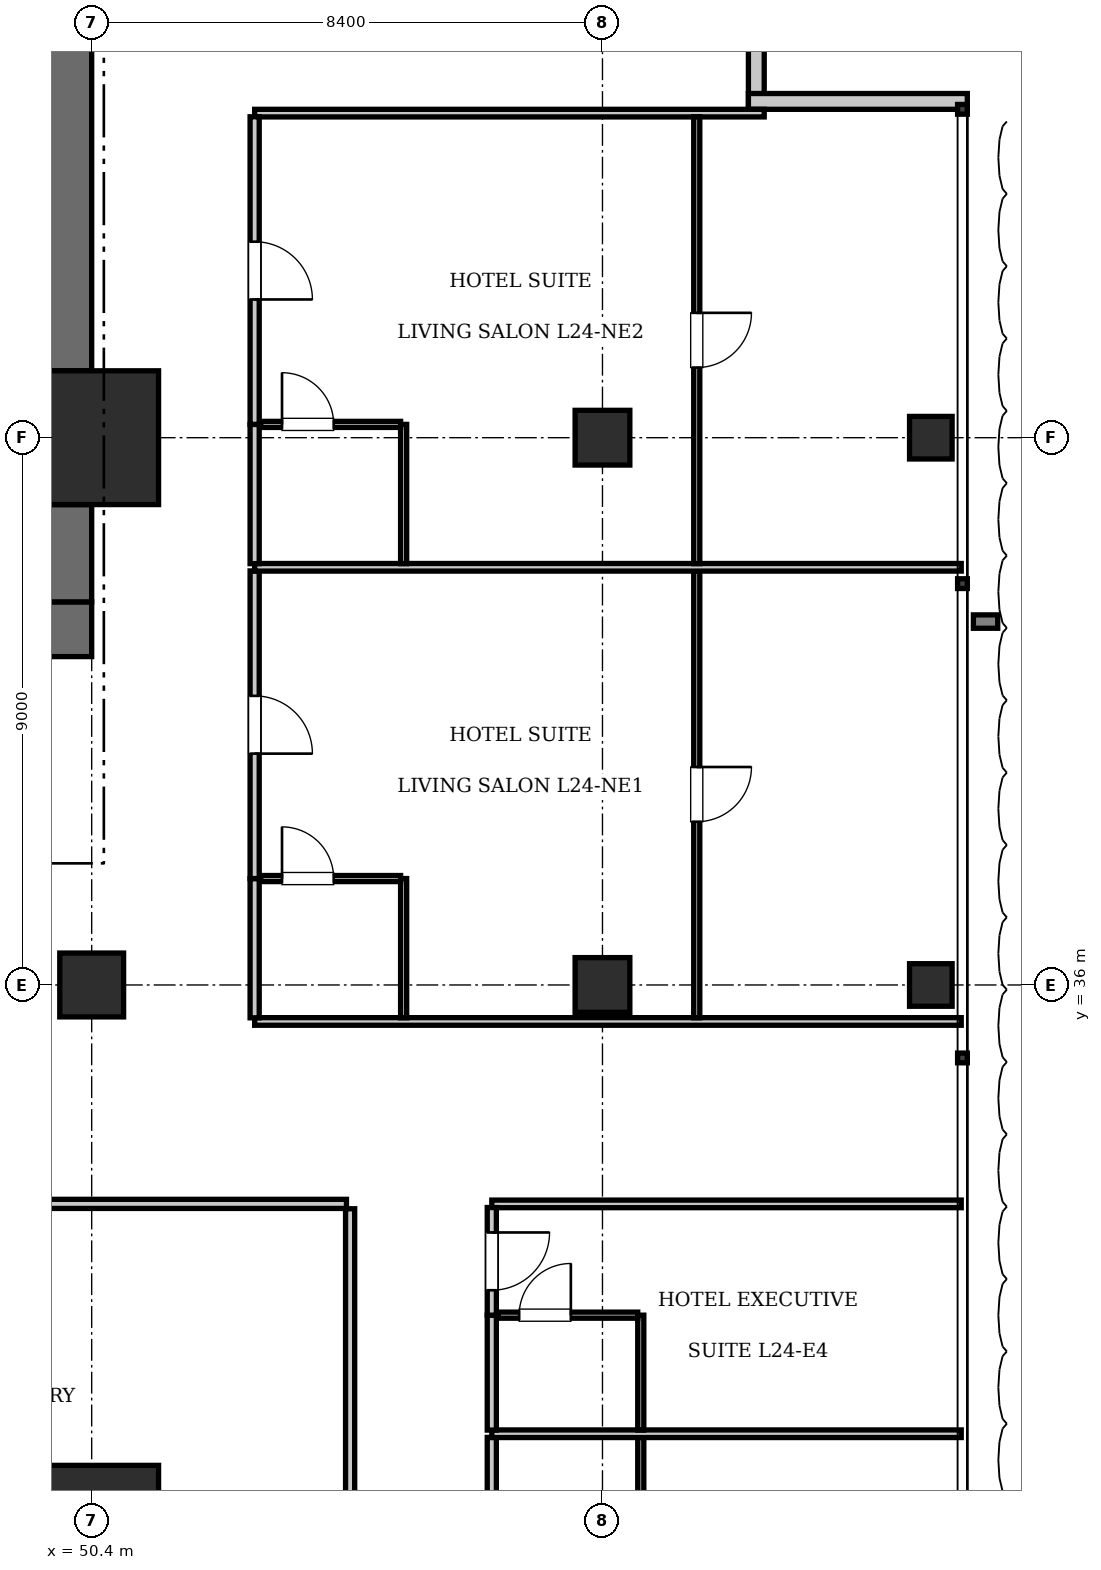
"""IFC4 building model, lengths in metres.
Left out: names, types, materials, properties, quantities, classifications, styles, units other than length and angle.
Written with IfcOpenShell. Run it as: python <this file> out.ifc"""

import sys

from ifc_helpers import new_model, si_unit, direction, frame, frame_2d, origin, origin_2d, place, context, subcontext, project, spatial, rectangle, i_section, extrude, element, fill, save


model = new_model("IFC4")
c1 = context("Model", 3, precision=1e-05, world=origin(), true_north=direction((0.0, 1.0)))
c2 = subcontext(c1, "Body", "Model", "MODEL_VIEW")
j1 = project(units=[si_unit("LENGTHUNIT", "METRE"), si_unit("PLANEANGLEUNIT", "RADIAN")], contexts=[c1])
p1 = place(None, origin())
s1 = spatial("IfcSite", under=j1, at=p1, CompositionType="ELEMENT")
p2 = place(p1, origin())
s2 = spatial("IfcBuilding", under=s1, at=p2, CompositionType="ELEMENT")
p3 = place(p2, frame((0.0, 0.0, 100.1)))
s3 = spatial("IfcBuildingStorey", under=s2, at=p3, CompositionType="ELEMENT", Elevation=100.1)
for number, where, z_axis, x_axis in (
    (1, (50.4, 27.0, 0.0), (0.0, 0.0, 1.0), (1.0, 0.0, 0.0)),
    (2, (50.4, 45.0, 0.0), (0.0, 0.0, 1.0), (1.0, 0.0, 0.0)),
):
    element("IfcColumn", number, at=place(p3, frame(where, z_axis=z_axis, x_axis=x_axis)), inside=s3, PredefinedType="COLUMN", context=c2, shape_type="SweptSolid", body=[
        extrude(rectangle(XDim=2.2, YDim=2.2, at=origin_2d()), origin(), (0.0, 0.0, 1.0), 3.85),
    ])
p4 = place(p3, frame((43.6, 41.85, 0.0), z_axis=(0.0, 0.0, 1.0), x_axis=(1.0, 0.0, 0.0)))
e3 = element("IfcWall", 3, at=p4, inside=s3, PredefinedType="SHEAR", context=c2, shape_type="SweptSolid", body=[
    extrude(rectangle(XDim=6.8, YDim=0.9, at=frame_2d((3.4, 0.0))), origin(), (0.0, 0.0, 1.0), 3.85),
])
p5 = place(p4, frame((3.9, 0.0, 0.0)))
e4 = element("IfcOpeningElement", 4, at=p5, cuts=e3, PredefinedType="OPENING", context=c2, shape_type="SweptSolid", body=[
    extrude(rectangle(XDim=1.15, YDim=2.15, at=frame_2d((0.575, 1.075))), frame((0.0, 0.46, 0.0), z_axis=(0.0, -1.0, 0.0), x_axis=(1.0, 0.0, 0.0)), (0.0, 0.0, 1.0), 0.92),
])
p6 = place(p4, frame((0.55, 0.0, 0.0)))
e5 = element("IfcOpeningElement", 5, at=p6, cuts=e3, PredefinedType="OPENING", context=c2, shape_type="SweptSolid", body=[
    extrude(rectangle(XDim=1.1, YDim=2.2, at=frame_2d((0.55, 1.1))), frame((0.0, 0.46, 0.0), z_axis=(0.0, -1.0, 0.0), x_axis=(1.0, 0.0, 0.0)), (0.0, 0.0, 1.0), 0.92),
])
p7 = place(p3, frame((49.95, 42.3, 0.0), z_axis=(0.0, 0.0, 1.0), x_axis=(0.0, 1.0, 0.0)))
e6 = element("IfcWall", 6, at=p7, inside=s3, PredefinedType="SHEAR", context=c2, shape_type="SweptSolid", body=[
    extrude(rectangle(XDim=1.6, YDim=0.9, at=frame_2d((0.8, 0.0))), origin(), (0.0, 0.0, 1.0), 3.85),
])
p8 = place(p3, frame((49.95, 46.1, 0.0), z_axis=(0.0, 0.0, 1.0), x_axis=(0.0, 1.0, 0.0)))
e7 = element("IfcWall", 7, at=p8, inside=s3, PredefinedType="SHEAR", context=c2, shape_type="SweptSolid", body=[
    extrude(rectangle(XDim=7.0, YDim=0.9, at=frame_2d((3.5, 0.0))), origin(), (0.0, 0.0, 1.0), 3.85),
])
p9 = place(p3, frame((50.4, 36.0, 0.0), z_axis=(0.0, 0.0, 1.0), x_axis=(1.0, 0.0, 0.0)))
e8 = element("IfcColumn", 8, at=p9, inside=s3, PredefinedType="COLUMN", context=c2, shape_type="SweptSolid", body=[
    extrude(rectangle(XDim=1.05, YDim=1.05, at=origin_2d()), origin(), (0.0, 0.0, 1.0), 3.85),
])
for number, where, z_axis, x_axis in (
    (9, (58.8, 36.0, 0.0), (0.0, 0.0, 1.0), (1.0, 0.0, 0.0)),
    (10, (58.8, 45.0, 0.0), (0.0, 0.0, 1.0), (1.0, 0.0, 0.0)),
):
    element("IfcColumn", number, at=place(p3, frame(where, z_axis=z_axis, x_axis=x_axis)), inside=s3, PredefinedType="COLUMN", context=c2, shape_type="SweptSolid", body=[
        extrude(rectangle(XDim=0.9, YDim=0.9, at=origin_2d()), origin(), (0.0, 0.0, 1.0), 3.85),
    ])
for number, where, z_axis, x_axis in (
    (11, (64.2, 36.0, 0.0), (0.0, 0.0, 1.0), (1.0, 0.0, 0.0)),
    (12, (64.2, 45.0, 0.0), (0.0, 0.0, 1.0), (1.0, 0.0, 0.0)),
):
    element("IfcColumn", number, at=place(p3, frame(where, z_axis=z_axis, x_axis=x_axis)), inside=s3, PredefinedType="COLUMN", context=c2, shape_type="SweptSolid", body=[
        extrude(i_section(OverallWidth=0.7, OverallDepth=0.7, WebThickness=0.028, FlangeThickness=0.044, at=origin_2d()), origin(), (0.0, 0.0, 1.0), 3.85),
    ])
for number, where, z_axis, x_axis in (
    (13, (61.33, 54.0, 0.0), (0.0, 0.0, 1.0), (0.0, -1.0, 0.0)),
    (14, (61.2, 50.53, 0.0), (0.0, 0.0, 1.0), (1.0, 0.0, 0.0)),
):
    element("IfcWall", number, at=place(p3, frame(where, z_axis=z_axis, x_axis=x_axis)), inside=s3, PredefinedType="SOLIDWALL", context=c2, shape_type="SweptSolid", body=[
        extrude(rectangle(XDim=3.6, YDim=0.26, at=frame_2d((1.8, 0.0))), origin(), (0.0, 0.0, 1.0), 3.61),
    ])
p10 = place(p3, frame((54.65, 24.98, 0.0), z_axis=(0.0, 0.0, 1.0), x_axis=(0.0, 1.0, 0.0)))
e15 = element("IfcWall", 15, at=p10, inside=s3, PredefinedType="PARTITIONING", context=c2, shape_type="SweptSolid", body=[
    extrude(rectangle(XDim=7.34, YDim=0.15, at=frame_2d((3.67, 0.0))), origin(), (0.0, 0.0, 1.0), 3.293),
])
p11 = place(p3, frame((43.222, 32.4, 0.0), z_axis=(0.0, 0.0, 1.0), x_axis=(1.0, 0.0, 0.0)))
e16 = element("IfcWall", 16, at=p11, inside=s3, PredefinedType="PARTITIONING", context=c2, shape_type="SweptSolid", body=[
    extrude(rectangle(XDim=11.368, YDim=0.15, at=frame_2d((5.684, 0.0))), origin(), (0.0, 0.0, 1.0), 3.61),
])
p12 = place(p11, frame((5.234, 0.0, 0.0)))
e17 = element("IfcOpeningElement", 17, at=p12, cuts=e16, PredefinedType="OPENING", context=c2, shape_type="SweptSolid", body=[
    extrude(rectangle(XDim=0.9, YDim=2.1, at=frame_2d((0.45, 1.05))), frame((0.0, 0.085, 0.0), z_axis=(0.0, -1.0, 0.0), x_axis=(1.0, 0.0, 0.0)), (0.0, 0.0, 1.0), 0.17),
])
p13 = place(p3, frame((56.98, 32.4, 0.0), z_axis=(0.0, 0.0, 1.0), x_axis=(1.0, 0.0, 0.0)))
e18 = element("IfcWall", 18, at=p13, inside=s3, PredefinedType="PARTITIONING", context=c2, shape_type="SweptSolid", body=[
    extrude(rectangle(XDim=7.72, YDim=0.125, at=frame_2d((3.86, 0.0))), origin(), (0.0, 0.0, 1.0), 3.61),
])
p14 = place(p3, frame((56.98, 26.67, 0.0), z_axis=(0.0, 0.0, 1.0), x_axis=(0.0, 1.0, 0.0)))
e19 = element("IfcWall", 19, at=p14, inside=s3, PredefinedType="PARTITIONING", context=c2, shape_type="SweptSolid", body=[
    extrude(rectangle(XDim=1.89, YDim=0.15, at=frame_2d((0.945, 0.0))), origin(), (0.0, 0.0, 1.0), 3.61),
])
p15 = place(p3, frame((59.43, 26.67, 0.0), z_axis=(0.0, 0.0, 1.0), x_axis=(0.0, 1.0, 0.0)))
e20 = element("IfcWall", 20, at=p15, inside=s3, PredefinedType="PARTITIONING", context=c2, shape_type="SweptSolid", body=[
    extrude(rectangle(XDim=1.89, YDim=0.1, at=frame_2d((0.945, 0.0))), origin(), (0.0, 0.0, 1.0), 3.61),
])
p16 = place(p3, frame((56.98, 28.62, 0.0), z_axis=(0.0, 0.0, 1.0), x_axis=(1.0, 0.0, 0.0)))
e21 = element("IfcWall", 21, at=p16, inside=s3, PredefinedType="PARTITIONING", context=c2, shape_type="SweptSolid", body=[
    extrude(rectangle(XDim=7.72, YDim=0.125, at=frame_2d((3.86, 0.0))), origin(), (0.0, 0.0, 1.0), 3.61),
])
p17 = place(p3, frame((56.98, 28.68, 0.0), z_axis=(0.0, 0.0, 1.0), x_axis=(0.0, 1.0, 0.0)))
e22 = element("IfcWall", 22, at=p17, inside=s3, PredefinedType="PARTITIONING", context=c2, shape_type="SweptSolid", body=[
    extrude(rectangle(XDim=1.89, YDim=0.15, at=frame_2d((0.945, 0.0))), origin(), (0.0, 0.0, 1.0), 3.61),
])
p18 = place(p3, frame((56.98, 30.57, 0.0), z_axis=(0.0, 0.0, 1.0), x_axis=(0.0, 1.0, 0.0)))
e23 = element("IfcWall", 23, at=p18, inside=s3, PredefinedType="PARTITIONING", context=c2, shape_type="SweptSolid", body=[
    extrude(rectangle(XDim=1.77, YDim=0.15, at=frame_2d((0.885, 0.0))), origin(), (0.0, 0.0, 1.0), 3.61),
])
p19 = place(p18, frame((0.41, 0.0, 0.0)))
e24 = element("IfcOpeningElement", 24, at=p19, cuts=e23, PredefinedType="OPENING", context=c2, shape_type="SweptSolid", body=[
    extrude(rectangle(XDim=0.95, YDim=2.15, at=frame_2d((0.475, 1.075))), frame((0.0, 0.085, 0.0), z_axis=(0.0, -1.0, 0.0), x_axis=(1.0, 0.0, 0.0)), (0.0, 0.0, 1.0), 0.17),
])
p20 = place(p3, frame((59.43, 28.68, 0.0), z_axis=(0.0, 0.0, 1.0), x_axis=(0.0, 1.0, 0.0)))
e25 = element("IfcWall", 25, at=p20, inside=s3, PredefinedType="PARTITIONING", context=c2, shape_type="SweptSolid", body=[
    extrude(rectangle(XDim=1.89, YDim=0.1, at=frame_2d((0.945, 0.0))), origin(), (0.0, 0.0, 1.0), 3.61),
])
p21 = place(p3, frame((57.08, 30.57, 0.0), z_axis=(0.0, 0.0, 1.0), x_axis=(1.0, 0.0, 0.0)))
e26 = element("IfcWall", 26, at=p21, inside=s3, PredefinedType="PARTITIONING", context=c2, shape_type="SweptSolid", body=[
    extrude(rectangle(XDim=2.3, YDim=0.1, at=frame_2d((1.15, 0.0))), origin(), (0.0, 0.0, 1.0), 3.61),
])
p22 = place(p21, frame((0.35, 0.0, 0.0)))
e27 = element("IfcOpeningElement", 27, at=p22, cuts=e26, PredefinedType="OPENING", context=c2, shape_type="SweptSolid", body=[
    extrude(rectangle(XDim=0.85, YDim=2.1, at=frame_2d((0.425, 1.05))), frame((0.0, 0.06, 0.0), z_axis=(0.0, -1.0, 0.0), x_axis=(1.0, 0.0, 0.0)), (0.0, 0.0, 1.0), 0.12),
])
p23 = place(p3, frame((53.08, 35.4, 0.0), z_axis=(0.0, 0.0, 1.0), x_axis=(1.0, 0.0, 0.0)))
e28 = element("IfcWall", 28, at=p23, inside=s3, PredefinedType="PARTITIONING", context=c2, shape_type="SweptSolid", body=[
    extrude(rectangle(XDim=11.62, YDim=0.125, at=frame_2d((5.81, 0.0))), origin(), (0.0, 0.0, 1.0), 3.61),
])
p24 = place(p3, frame((53.08, 50.337, 0.0), z_axis=(0.0, 0.0, 1.0), x_axis=(1.0, 0.0, 0.0)))
e29 = element("IfcWall", 29, at=p24, inside=s3, PredefinedType="PARTITIONING", context=c2, shape_type="SweptSolid", body=[
    extrude(rectangle(XDim=8.38, YDim=0.125, at=frame_2d((4.19, 0.0))), origin(), (0.0, 0.0, 1.0), 3.61),
])
p25 = place(p3, frame((53.08, 35.46, 0.0), z_axis=(0.0, 0.0, 1.0), x_axis=(0.0, 1.0, 0.0)))
e30 = element("IfcWall", 30, at=p25, inside=s3, PredefinedType="PARTITIONING", context=c2, shape_type="SweptSolid", body=[
    extrude(rectangle(XDim=2.29, YDim=0.15, at=frame_2d((1.145, 0.0))), origin(), (0.0, 0.0, 1.0), 3.61),
])
p26 = place(p3, frame((53.08, 37.75, 0.0), z_axis=(0.0, 0.0, 1.0), x_axis=(0.0, 1.0, 0.0)))
e31 = element("IfcWall", 31, at=p26, inside=s3, PredefinedType="PARTITIONING", context=c2, shape_type="SweptSolid", body=[
    extrude(rectangle(XDim=5.059, YDim=0.15, at=frame_2d((2.529, 0.0))), origin(), (0.0, 0.0, 1.0), 3.61),
])
p27 = place(p26, frame((2.054, 0.0, 0.0)))
e32 = element("IfcOpeningElement", 32, at=p27, cuts=e31, PredefinedType="OPENING", context=c2, shape_type="SweptSolid", body=[
    extrude(rectangle(XDim=0.95, YDim=2.15, at=frame_2d((0.475, 1.075))), frame((0.0, 0.085, 0.0), z_axis=(0.0, -1.0, 0.0), x_axis=(1.0, 0.0, 0.0)), (0.0, 0.0, 1.0), 0.17),
])
p28 = place(p3, frame((55.53, 35.46, 0.0), z_axis=(0.0, 0.0, 1.0), x_axis=(0.0, 1.0, 0.0)))
e33 = element("IfcWall", 33, at=p28, inside=s3, PredefinedType="PARTITIONING", context=c2, shape_type="SweptSolid", body=[
    extrude(rectangle(XDim=2.29, YDim=0.1, at=frame_2d((1.145, 0.0))), origin(), (0.0, 0.0, 1.0), 3.61),
])
p29 = place(p3, frame((53.18, 37.75, 0.0), z_axis=(0.0, 0.0, 1.0), x_axis=(1.0, 0.0, 0.0)))
e34 = element("IfcWall", 34, at=p29, inside=s3, PredefinedType="PARTITIONING", context=c2, shape_type="SweptSolid", body=[
    extrude(rectangle(XDim=2.3, YDim=0.1, at=frame_2d((1.15, 0.0))), origin(), (0.0, 0.0, 1.0), 3.61),
])
p30 = place(p29, frame((0.35, 0.0, 0.0)))
e35 = element("IfcOpeningElement", 35, at=p30, cuts=e34, PredefinedType="OPENING", context=c2, shape_type="SweptSolid", body=[
    extrude(rectangle(XDim=0.85, YDim=2.1, at=frame_2d((0.425, 1.05))), frame((0.0, 0.06, 0.0), z_axis=(0.0, -1.0, 0.0), x_axis=(1.0, 0.0, 0.0)), (0.0, 0.0, 1.0), 0.12),
])
p31 = place(p3, frame((60.35, 35.46, 0.0), z_axis=(0.0, 0.0, 1.0), x_axis=(0.0, 1.0, 0.0)))
e36 = element("IfcWall", 36, at=p31, inside=s3, PredefinedType="PARTITIONING", context=c2, shape_type="SweptSolid", body=[
    extrude(rectangle(XDim=7.349, YDim=0.1, at=frame_2d((3.674, 0.0))), origin(), (0.0, 0.0, 1.0), 3.61),
])
p32 = place(p31, frame((3.224, 0.0, 0.0)))
e37 = element("IfcOpeningElement", 37, at=p32, cuts=e36, PredefinedType="OPENING", context=c2, shape_type="SweptSolid", body=[
    extrude(rectangle(XDim=0.9, YDim=2.1, at=frame_2d((0.45, 1.05))), frame((0.0, 0.06, 0.0), z_axis=(0.0, -1.0, 0.0), x_axis=(1.0, 0.0, 0.0)), (0.0, 0.0, 1.0), 0.12),
])
p33 = place(p3, frame((53.08, 42.869, 0.0), z_axis=(0.0, 0.0, 1.0), x_axis=(1.0, 0.0, 0.0)))
e38 = element("IfcWall", 38, at=p33, inside=s3, PredefinedType="PARTITIONING", context=c2, shape_type="SweptSolid", body=[
    extrude(rectangle(XDim=11.62, YDim=0.125, at=frame_2d((5.81, 0.0))), origin(), (0.0, 0.0, 1.0), 3.61),
])
p34 = place(p3, frame((53.08, 42.929, 0.0), z_axis=(0.0, 0.0, 1.0), x_axis=(0.0, 1.0, 0.0)))
e39 = element("IfcWall", 39, at=p34, inside=s3, PredefinedType="PARTITIONING", context=c2, shape_type="SweptSolid", body=[
    extrude(rectangle(XDim=2.29, YDim=0.15, at=frame_2d((1.145, 0.0))), origin(), (0.0, 0.0, 1.0), 3.61),
])
p35 = place(p3, frame((53.08, 45.219, 0.0), z_axis=(0.0, 0.0, 1.0), x_axis=(0.0, 1.0, 0.0)))
e40 = element("IfcWall", 40, at=p35, inside=s3, PredefinedType="PARTITIONING", context=c2, shape_type="SweptSolid", body=[
    extrude(rectangle(XDim=5.059, YDim=0.15, at=frame_2d((2.529, 0.0))), origin(), (0.0, 0.0, 1.0), 3.61),
])
p36 = place(p35, frame((2.054, 0.0, 0.0)))
e41 = element("IfcOpeningElement", 41, at=p36, cuts=e40, PredefinedType="OPENING", context=c2, shape_type="SweptSolid", body=[
    extrude(rectangle(XDim=0.95, YDim=2.15, at=frame_2d((0.475, 1.075))), frame((0.0, 0.085, 0.0), z_axis=(0.0, -1.0, 0.0), x_axis=(1.0, 0.0, 0.0)), (0.0, 0.0, 1.0), 0.17),
])
p37 = place(p3, frame((55.53, 42.929, 0.0), z_axis=(0.0, 0.0, 1.0), x_axis=(0.0, 1.0, 0.0)))
e42 = element("IfcWall", 42, at=p37, inside=s3, PredefinedType="PARTITIONING", context=c2, shape_type="SweptSolid", body=[
    extrude(rectangle(XDim=2.29, YDim=0.1, at=frame_2d((1.145, 0.0))), origin(), (0.0, 0.0, 1.0), 3.61),
])
p38 = place(p3, frame((53.18, 45.219, 0.0), z_axis=(0.0, 0.0, 1.0), x_axis=(1.0, 0.0, 0.0)))
e43 = element("IfcWall", 43, at=p38, inside=s3, PredefinedType="PARTITIONING", context=c2, shape_type="SweptSolid", body=[
    extrude(rectangle(XDim=2.3, YDim=0.1, at=frame_2d((1.15, 0.0))), origin(), (0.0, 0.0, 1.0), 3.61),
])
p39 = place(p38, frame((0.35, 0.0, 0.0)))
e44 = element("IfcOpeningElement", 44, at=p39, cuts=e43, PredefinedType="OPENING", context=c2, shape_type="SweptSolid", body=[
    extrude(rectangle(XDim=0.85, YDim=2.1, at=frame_2d((0.425, 1.05))), frame((0.0, 0.06, 0.0), z_axis=(0.0, -1.0, 0.0), x_axis=(1.0, 0.0, 0.0)), (0.0, 0.0, 1.0), 0.12),
])
p40 = place(p3, frame((60.35, 42.929, 0.0), z_axis=(0.0, 0.0, 1.0), x_axis=(0.0, 1.0, 0.0)))
e45 = element("IfcWall", 45, at=p40, inside=s3, PredefinedType="PARTITIONING", context=c2, shape_type="SweptSolid", body=[
    extrude(rectangle(XDim=7.349, YDim=0.1, at=frame_2d((3.674, 0.0))), origin(), (0.0, 0.0, 1.0), 3.61),
])
p41 = place(p40, frame((3.224, 0.0, 0.0)))
e46 = element("IfcOpeningElement", 46, at=p41, cuts=e45, PredefinedType="OPENING", context=c2, shape_type="SweptSolid", body=[
    extrude(rectangle(XDim=0.9, YDim=2.1, at=frame_2d((0.45, 1.05))), frame((0.0, 0.06, 0.0), z_axis=(0.0, -1.0, 0.0), x_axis=(1.0, 0.0, 0.0)), (0.0, 0.0, 1.0), 0.12),
])
p42 = place(p22, origin())
e47 = element("IfcDoor", 47, at=p42, inside=s3, OperationType="SINGLE_SWING_RIGHT", PredefinedType="DOOR", context=c2, shape_type="SweptSolid", body=[
    extrude(rectangle(XDim=0.85, YDim=2.1, at=frame_2d((0.425, 1.05))), frame((0.0, 0.025, 0.0), z_axis=(0.0, -1.0, 0.0), x_axis=(1.0, 0.0, 0.0)), (0.0, 0.0, 1.0), 0.05),
])
fill(e27, e47)
p43 = place(p19, frame((0.95, 0.0, 0.0), z_axis=(0.0, 0.0, 1.0), x_axis=(-1.0, 0.0, 0.0)))
e48 = element("IfcDoor", 48, at=p43, inside=s3, OperationType="SINGLE_SWING_LEFT", PredefinedType="DOOR", context=c2, shape_type="SweptSolid", body=[
    extrude(rectangle(XDim=0.95, YDim=2.15, at=frame_2d((0.475, 1.075))), frame((0.0, 0.025, 0.0), z_axis=(0.0, -1.0, 0.0), x_axis=(1.0, 0.0, 0.0)), (0.0, 0.0, 1.0), 0.05),
])
fill(e24, e48)
p44 = place(p30, origin())
e49 = element("IfcDoor", 49, at=p44, inside=s3, OperationType="SINGLE_SWING_LEFT", PredefinedType="DOOR", context=c2, shape_type="SweptSolid", body=[
    extrude(rectangle(XDim=0.85, YDim=2.1, at=frame_2d((0.425, 1.05))), frame((0.0, 0.025, 0.0), z_axis=(0.0, -1.0, 0.0), x_axis=(1.0, 0.0, 0.0)), (0.0, 0.0, 1.0), 0.05),
])
fill(e35, e49)
p45 = place(p27, frame((0.95, 0.0, 0.0), z_axis=(0.0, 0.0, 1.0), x_axis=(-1.0, 0.0, 0.0)))
e50 = element("IfcDoor", 50, at=p45, inside=s3, OperationType="SINGLE_SWING_RIGHT", PredefinedType="DOOR", context=c2, shape_type="SweptSolid", body=[
    extrude(rectangle(XDim=0.95, YDim=2.15, at=frame_2d((0.475, 1.075))), frame((0.0, 0.025, 0.0), z_axis=(0.0, -1.0, 0.0), x_axis=(1.0, 0.0, 0.0)), (0.0, 0.0, 1.0), 0.05),
])
fill(e32, e50)
p46 = place(p32, frame((0.9, 0.0, 0.0), z_axis=(0.0, 0.0, 1.0), x_axis=(-1.0, 0.0, 0.0)))
e51 = element("IfcDoor", 51, at=p46, inside=s3, OperationType="SINGLE_SWING_LEFT", PredefinedType="DOOR", context=c2, shape_type="SweptSolid", body=[
    extrude(rectangle(XDim=0.9, YDim=2.1, at=frame_2d((0.45, 1.05))), frame((0.0, 0.025, 0.0), z_axis=(0.0, -1.0, 0.0), x_axis=(1.0, 0.0, 0.0)), (0.0, 0.0, 1.0), 0.05),
])
fill(e37, e51)
p47 = place(p39, origin())
e52 = element("IfcDoor", 52, at=p47, inside=s3, OperationType="SINGLE_SWING_LEFT", PredefinedType="DOOR", context=c2, shape_type="SweptSolid", body=[
    extrude(rectangle(XDim=0.85, YDim=2.1, at=frame_2d((0.425, 1.05))), frame((0.0, 0.025, 0.0), z_axis=(0.0, -1.0, 0.0), x_axis=(1.0, 0.0, 0.0)), (0.0, 0.0, 1.0), 0.05),
])
fill(e44, e52)
p48 = place(p36, frame((0.95, 0.0, 0.0), z_axis=(0.0, 0.0, 1.0), x_axis=(-1.0, 0.0, 0.0)))
e53 = element("IfcDoor", 53, at=p48, inside=s3, OperationType="SINGLE_SWING_RIGHT", PredefinedType="DOOR", context=c2, shape_type="SweptSolid", body=[
    extrude(rectangle(XDim=0.95, YDim=2.15, at=frame_2d((0.475, 1.075))), frame((0.0, 0.025, 0.0), z_axis=(0.0, -1.0, 0.0), x_axis=(1.0, 0.0, 0.0)), (0.0, 0.0, 1.0), 0.05),
])
fill(e41, e53)
p49 = place(p41, frame((0.9, 0.0, 0.0), z_axis=(0.0, 0.0, 1.0), x_axis=(-1.0, 0.0, 0.0)))
e54 = element("IfcDoor", 54, at=p49, inside=s3, OperationType="SINGLE_SWING_LEFT", PredefinedType="DOOR", context=c2, shape_type="SweptSolid", body=[
    extrude(rectangle(XDim=0.9, YDim=2.1, at=frame_2d((0.45, 1.05))), frame((0.0, 0.025, 0.0), z_axis=(0.0, -1.0, 0.0), x_axis=(1.0, 0.0, 0.0)), (0.0, 0.0, 1.0), 0.05),
])
fill(e46, e54)
save(model, sys.argv[1])
